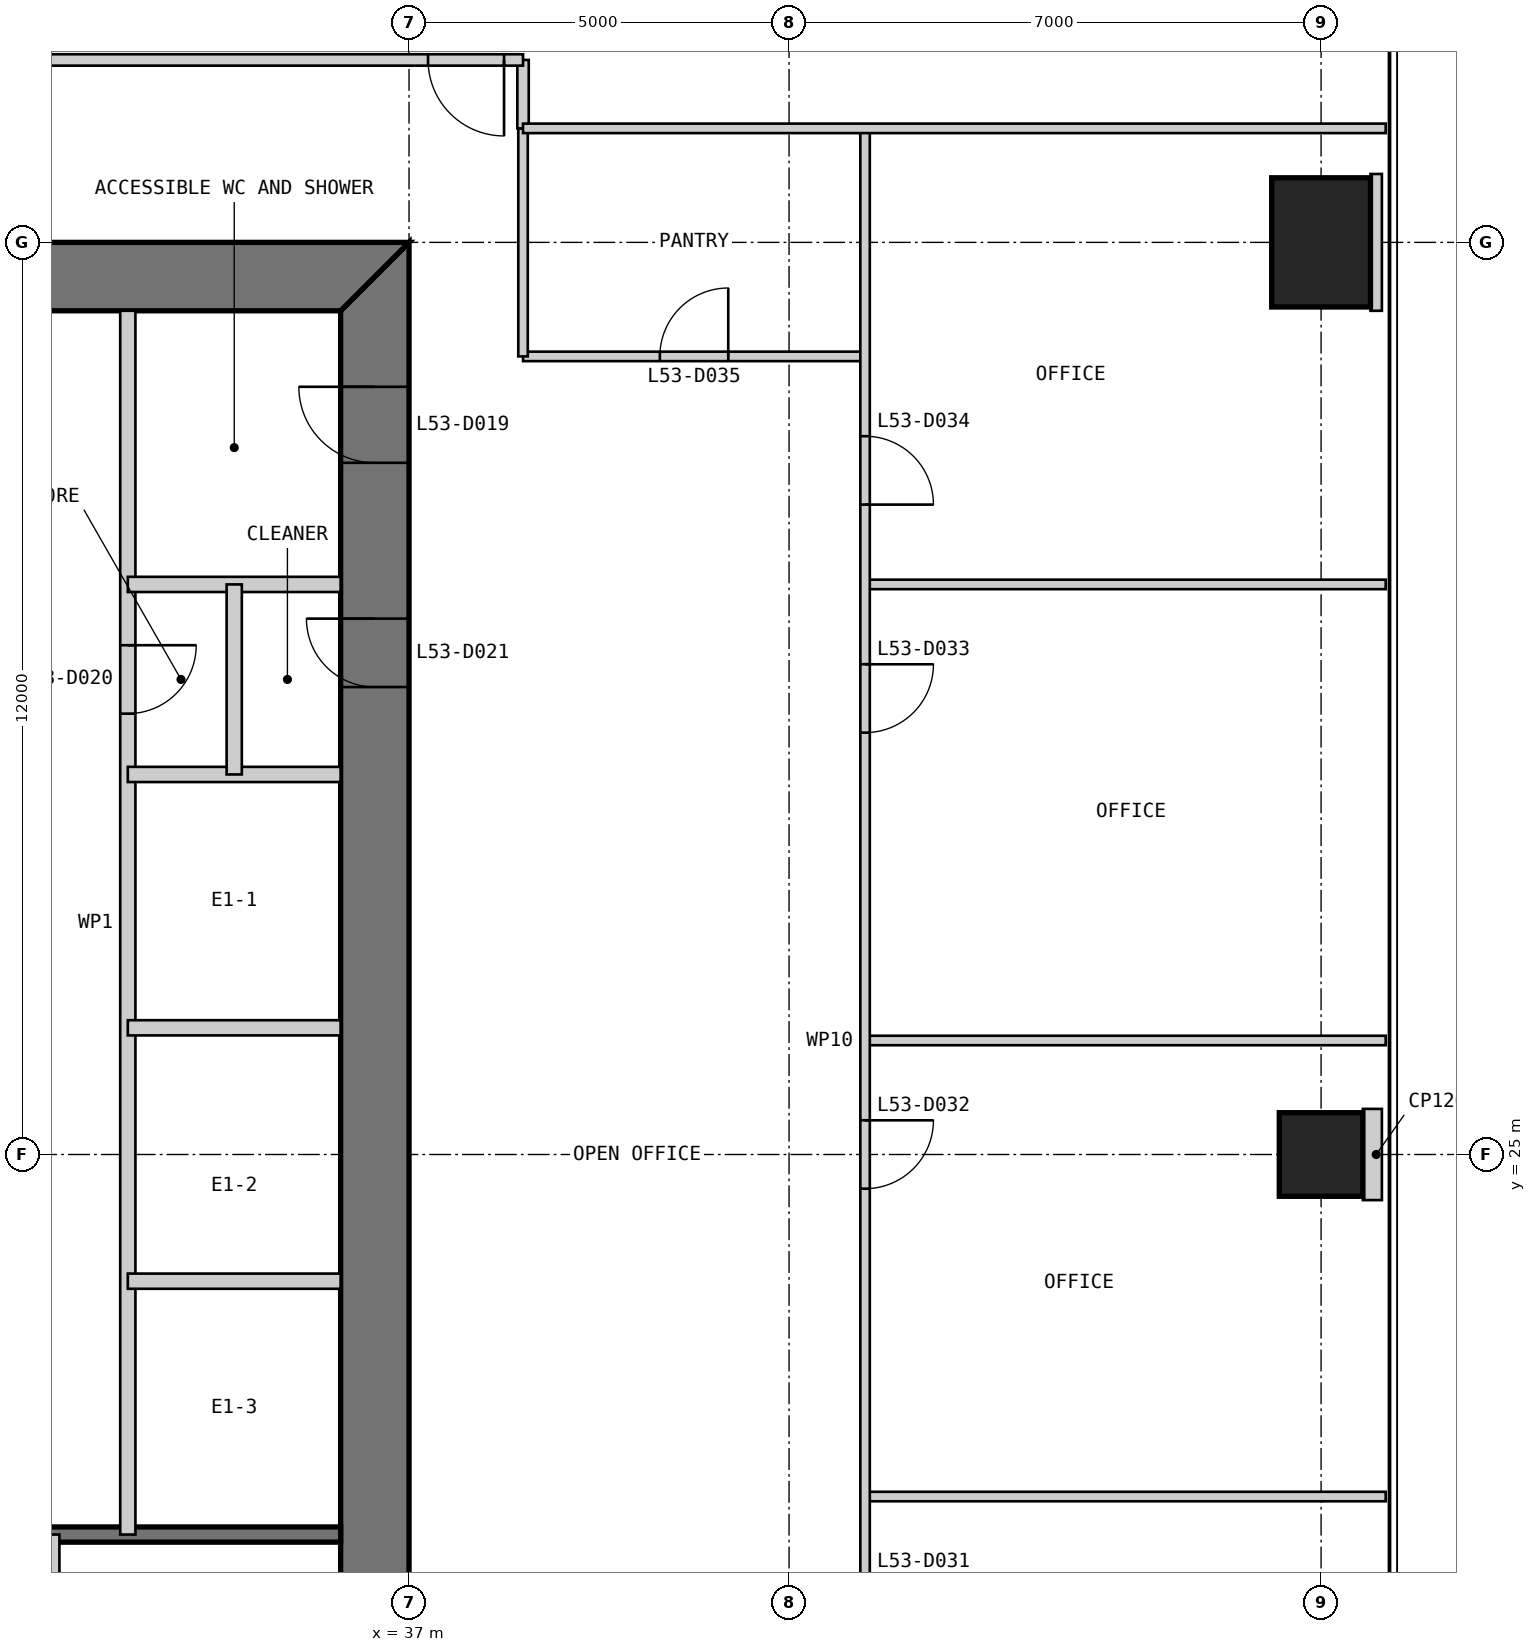
"""IFC4 building model, lengths in metres.
Left out: names, types, materials, properties, quantities, classifications, styles, units other than length and angle.
Written with IfcOpenShell. Run it as: python <this file> out.ifc"""

import sys

from ifc_helpers import new_model, si_unit, direction, frame, frame_2d, origin, origin_2d, place, context, subcontext, project, spatial, polyline, rectangle, outline, extrude, element, fill, save


model = new_model("IFC4")
c1 = context("Model", 3, precision=1e-05, world=origin(), true_north=direction((0.0, 1.0)))
c2 = subcontext(c1, "Body", "Model", "MODEL_VIEW")
j1 = project(units=[si_unit("LENGTHUNIT", "METRE"), si_unit("PLANEANGLEUNIT", "RADIAN")], contexts=[c1])
p1 = place(None, origin())
s1 = spatial("IfcSite", under=j1, at=p1, CompositionType="ELEMENT")
p2 = place(p1, origin())
s2 = spatial("IfcBuilding", under=s1, at=p2, CompositionType="ELEMENT")
p3 = place(p2, frame((0.0, 0.0, 225.8)))
s3 = spatial("IfcBuildingStorey", under=s2, at=p3, CompositionType="ELEMENT", Elevation=225.8)
p4 = place(p3, frame((49.0, 25.0, 0.0), z_axis=(0.0, 0.0, 1.0), x_axis=(1.0, 0.0, 0.0)))
e1 = element("IfcColumn", 1, at=p4, inside=s3, PredefinedType="COLUMN", context=c2, shape_type="SweptSolid", body=[
    extrude(rectangle(XDim=1.1, YDim=1.1, at=origin_2d()), origin(), (0.0, 0.0, 1.0), 4.0),
])
p5 = place(p3, frame((49.0, 37.0, 0.0), z_axis=(0.0, 0.0, 1.0), x_axis=(1.0, 0.0, 0.0)))
e2 = element("IfcColumn", 2, at=p5, inside=s3, PredefinedType="COLUMN", context=c2, shape_type="SweptSolid", body=[
    extrude(rectangle(XDim=1.3, YDim=1.7, at=origin_2d()), origin(), (0.0, 0.0, 1.0), 4.0),
])
p6 = place(p3, frame((36.55, 13.9, 0.0), z_axis=(0.0, 0.0, 1.0), x_axis=(0.0, 1.0, 0.0)))
e3 = element("IfcWall", 3, at=p6, inside=s3, PredefinedType="SHEAR", context=c2, shape_type="SweptSolid", body=[
    extrude(outline(polyline([(-0.9, -0.45), (23.1, -0.45), (22.2, 0.45), (0.0, 0.45), (-0.9, -0.45)])), origin(), (0.0, 0.0, 1.0), 4.0),
])
p7 = place(p6, frame((20.2, 0.0, 0.0)))
e4 = element("IfcOpeningElement", 4, at=p7, cuts=e3, PredefinedType="OPENING", context=c2, shape_type="SweptSolid", body=[
    extrude(rectangle(XDim=1.0, YDim=2.2, at=frame_2d((0.5, 1.1))), frame((0.0, 0.46, 0.0), z_axis=(0.0, -1.0, 0.0), x_axis=(1.0, 0.0, 0.0)), (0.0, 0.0, 1.0), 0.92),
])
p8 = place(p6, frame((17.25, 0.0, 0.0)))
e5 = element("IfcOpeningElement", 5, at=p8, cuts=e3, PredefinedType="OPENING", context=c2, shape_type="SweptSolid", body=[
    extrude(rectangle(XDim=0.9, YDim=2.2, at=frame_2d((0.45, 1.1))), frame((0.0, 0.46, 0.0), z_axis=(0.0, -1.0, 0.0), x_axis=(1.0, 0.0, 0.0)), (0.0, 0.0, 1.0), 0.92),
])
p9 = place(p3, frame((37.0, 36.55, 0.0), z_axis=(0.0, 0.0, 1.0), x_axis=(-1.0, 0.0, 0.0)))
e6 = element("IfcWall", 6, at=p9, inside=s3, PredefinedType="SHEAR", context=c2, shape_type="SweptSolid", body=[
    extrude(outline(polyline([(0.0, -0.45), (24.0, -0.45), (23.1, 0.45), (0.9, 0.45), (0.0, -0.45)])), origin(), (0.0, 0.0, 1.0), 4.0),
])
p10 = place(p9, frame((4.9, 0.0, 0.0)))
e7 = element("IfcOpeningElement", 7, at=p10, cuts=e6, PredefinedType="OPENING", context=c2, shape_type="SweptSolid", body=[
    extrude(rectangle(XDim=1.0, YDim=2.2, at=frame_2d((0.5, 1.1))), frame((0.0, 0.46, 0.0), z_axis=(0.0, -1.0, 0.0), x_axis=(1.0, 0.0, 0.0)), (0.0, 0.0, 1.0), 0.92),
])
p11 = place(p9, frame((8.9, 0.0, 0.0)))
e8 = element("IfcOpeningElement", 8, at=p11, cuts=e6, PredefinedType="OPENING", context=c2, shape_type="SweptSolid", body=[
    extrude(rectangle(XDim=1.1, YDim=2.2, at=frame_2d((0.55, 1.1))), frame((0.0, 0.46, 0.0), z_axis=(0.0, -1.0, 0.0), x_axis=(1.0, 0.0, 0.0)), (0.0, 0.0, 1.0), 0.92),
])
p12 = place(p9, frame((15.05, 0.0, 0.0)))
e9 = element("IfcOpeningElement", 9, at=p12, cuts=e6, PredefinedType="OPENING", context=c2, shape_type="SweptSolid", body=[
    extrude(rectangle(XDim=0.9, YDim=2.2, at=frame_2d((0.45, 1.1))), frame((0.0, 0.46, 0.0), z_axis=(0.0, -1.0, 0.0), x_axis=(1.0, 0.0, 0.0)), (0.0, 0.0, 1.0), 0.92),
])
p13 = place(p9, frame((17.9, 0.0, 0.0)))
e10 = element("IfcOpeningElement", 10, at=p13, cuts=e6, PredefinedType="OPENING", context=c2, shape_type="SweptSolid", body=[
    extrude(rectangle(XDim=1.0, YDim=2.2, at=frame_2d((0.5, 1.1))), frame((0.0, 0.46, 0.0), z_axis=(0.0, -1.0, 0.0), x_axis=(1.0, 0.0, 0.0)), (0.0, 0.0, 1.0), 0.92),
])
p14 = place(p9, frame((21.4, 0.0, 0.0)))
e11 = element("IfcOpeningElement", 11, at=p14, cuts=e6, PredefinedType="OPENING", context=c2, shape_type="SweptSolid", body=[
    extrude(rectangle(XDim=1.0, YDim=2.2, at=frame_2d((0.5, 1.1))), frame((0.0, 0.46, 0.0), z_axis=(0.0, -1.0, 0.0), x_axis=(1.0, 0.0, 0.0)), (0.0, 0.0, 1.0), 0.92),
])
p15 = place(p3, frame((20.3, 20.0, 0.0), z_axis=(0.0, 0.0, 1.0), x_axis=(1.0, 0.0, 0.0)))
e12 = element("IfcWall", 12, at=p15, inside=s3, PredefinedType="SOLIDWALL", context=c2, shape_type="SweptSolid", body=[
    extrude(rectangle(XDim=15.8, YDim=0.2, at=frame_2d((7.9, 0.0))), origin(), (0.0, 0.0, 1.0), 3.8),
])
p16 = place(p3, frame((32.3, 13.9, 0.0), z_axis=(0.0, 0.0, 1.0), x_axis=(0.0, 1.0, 0.0)))
e13 = element("IfcWall", 13, at=p16, inside=s3, PredefinedType="PARTITIONING", context=c2, shape_type="SweptSolid", body=[
    extrude(rectangle(XDim=6.1, YDim=0.2, at=frame_2d((3.05, 0.0))), origin(), (0.0, 0.0, 1.0), 3.8),
])
p17 = place(p3, frame((33.3, 36.1, 0.0), z_axis=(0.0, 0.0, 1.0), x_axis=(0.0, -1.0, 0.0)))
e14 = element("IfcWall", 14, at=p17, inside=s3, PredefinedType="PARTITIONING", context=c2, shape_type="SweptSolid", body=[
    extrude(rectangle(XDim=16.1, YDim=0.2, at=frame_2d((8.05, 0.0))), origin(), (0.0, 0.0, 1.0), 3.8),
])
p18 = place(p17, frame((4.4, 0.0, 0.0)))
e15 = element("IfcOpeningElement", 15, at=p18, cuts=e14, PredefinedType="OPENING", context=c2, shape_type="SweptSolid", body=[
    extrude(rectangle(XDim=0.9, YDim=2.2, at=frame_2d((0.45, 1.1))), frame((0.0, 0.11, 0.0), z_axis=(0.0, -1.0, 0.0), x_axis=(1.0, 0.0, 0.0)), (0.0, 0.0, 1.0), 0.22),
])
for number, where, z_axis, x_axis in (
    (16, (36.1, 30.0, 0.0), (0.0, 0.0, 1.0), (-1.0, 0.0, 0.0)),
    (17, (36.1, 26.667, 0.0), (0.0, 0.0, 1.0), (-1.0, 0.0, 0.0)),
    (18, (36.1, 23.333, 0.0), (0.0, 0.0, 1.0), (-1.0, 0.0, 0.0)),
    (19, (36.1, 32.5, 0.0), (0.0, 0.0, 1.0), (-1.0, 0.0, 0.0)),
):
    element("IfcWall", number, at=place(p3, frame(where, z_axis=z_axis, x_axis=x_axis)), inside=s3, PredefinedType="PARTITIONING", context=c2, shape_type="SweptSolid", body=[
        extrude(rectangle(XDim=2.8, YDim=0.2, at=frame_2d((1.4, 0.0))), origin(), (0.0, 0.0, 1.0), 3.8),
    ])
p19 = place(p3, frame((34.7, 32.5, 0.0), z_axis=(0.0, 0.0, 1.0), x_axis=(0.0, -1.0, 0.0)))
e20 = element("IfcWall", 20, at=p19, inside=s3, PredefinedType="PARTITIONING", context=c2, shape_type="SweptSolid", body=[
    extrude(rectangle(XDim=2.5, YDim=0.2, at=frame_2d((1.25, 0.0))), origin(), (0.0, 0.0, 1.0), 3.8),
])
for number, where, z_axis, x_axis in (
    (21, (49.85, 20.5, 0.0), (0.0, 0.0, 1.0), (-1.0, 0.0, 0.0)),
    (22, (49.85, 26.5, 0.0), (0.0, 0.0, 1.0), (-1.0, 0.0, 0.0)),
    (23, (49.85, 32.5, 0.0), (0.0, 0.0, 1.0), (-1.0, 0.0, 0.0)),
):
    element("IfcWall", number, at=place(p3, frame(where, z_axis=z_axis, x_axis=x_axis)), inside=s3, PredefinedType="PARTITIONING", context=c2, shape_type="SweptSolid", body=[
        extrude(rectangle(XDim=6.85, YDim=0.125, at=frame_2d((3.425, 0.0))), origin(), (0.0, 0.0, 1.0), 3.85),
    ])
p20 = place(p3, frame((43.0, 35.5, 0.0), z_axis=(0.0, 0.0, 1.0), x_axis=(-1.0, 0.0, 0.0)))
e24 = element("IfcWall", 24, at=p20, inside=s3, PredefinedType="PARTITIONING", context=c2, shape_type="SweptSolid", body=[
    extrude(rectangle(XDim=4.5, YDim=0.125, at=frame_2d((2.25, 0.0))), origin(), (0.0, 0.0, 1.0), 3.85),
])
p21 = place(p20, frame((1.8, 0.0, 0.0)))
e25 = element("IfcOpeningElement", 25, at=p21, cuts=e24, PredefinedType="OPENING", context=c2, shape_type="SweptSolid", body=[
    extrude(rectangle(XDim=0.9, YDim=2.2, at=frame_2d((0.45, 1.1))), frame((0.0, 0.073, 0.0), z_axis=(0.0, -1.0, 0.0), x_axis=(1.0, 0.0, 0.0)), (0.0, 0.0, 1.0), 0.145),
])
p22 = place(p3, frame((43.0, 14.5, 0.0), z_axis=(0.0, 0.0, 1.0), x_axis=(0.0, 1.0, 0.0)))
e26 = element("IfcWall", 26, at=p22, inside=s3, PredefinedType="PARTITIONING", context=c2, shape_type="SweptSolid", body=[
    extrude(rectangle(XDim=24.0, YDim=0.125, at=frame_2d((12.0, 0.0))), origin(), (0.0, 0.0, 1.0), 3.238),
])
p23 = place(p22, frame((4.05, 0.0, 0.0)))
e27 = element("IfcOpeningElement", 27, at=p23, cuts=e26, PredefinedType="OPENING", context=c2, shape_type="SweptSolid", body=[
    extrude(rectangle(XDim=0.9, YDim=2.2, at=frame_2d((0.45, 1.1))), frame((0.0, 0.073, 0.0), z_axis=(0.0, -1.0, 0.0), x_axis=(1.0, 0.0, 0.0)), (0.0, 0.0, 1.0), 0.145),
])
p24 = place(p22, frame((10.05, 0.0, 0.0)))
e28 = element("IfcOpeningElement", 28, at=p24, cuts=e26, PredefinedType="OPENING", context=c2, shape_type="SweptSolid", body=[
    extrude(rectangle(XDim=0.9, YDim=2.2, at=frame_2d((0.45, 1.1))), frame((0.0, 0.073, 0.0), z_axis=(0.0, -1.0, 0.0), x_axis=(1.0, 0.0, 0.0)), (0.0, 0.0, 1.0), 0.145),
])
p25 = place(p22, frame((16.05, 0.0, 0.0)))
e29 = element("IfcOpeningElement", 29, at=p25, cuts=e26, PredefinedType="OPENING", context=c2, shape_type="SweptSolid", body=[
    extrude(rectangle(XDim=0.9, YDim=2.2, at=frame_2d((0.45, 1.1))), frame((0.0, 0.073, 0.0), z_axis=(0.0, -1.0, 0.0), x_axis=(1.0, 0.0, 0.0)), (0.0, 0.0, 1.0), 0.145),
])
p26 = place(p22, frame((19.05, 0.0, 0.0)))
e30 = element("IfcOpeningElement", 30, at=p26, cuts=e26, PredefinedType="OPENING", context=c2, shape_type="SweptSolid", body=[
    extrude(rectangle(XDim=0.9, YDim=2.2, at=frame_2d((0.45, 1.1))), frame((0.0, 0.073, 0.0), z_axis=(0.0, -1.0, 0.0), x_axis=(1.0, 0.0, 0.0)), (0.0, 0.0, 1.0), 0.145),
])
p27 = place(p3, frame((38.5, 35.5, 0.0), z_axis=(0.0, 0.0, 1.0), x_axis=(0.0, 1.0, 0.0)))
e31 = element("IfcWall", 31, at=p27, inside=s3, PredefinedType="PARTITIONING", context=c2, shape_type="SweptSolid", body=[
    extrude(rectangle(XDim=3.0, YDim=0.125, at=frame_2d((1.5, 0.0))), origin(), (0.0, 0.0, 1.0), 3.85),
])
p28 = place(p3, frame((38.5, 38.5, 0.0), z_axis=(0.0, 0.0, 1.0), x_axis=(0.0, 1.0, 0.0)))
e32 = element("IfcWall", 32, at=p28, inside=s3, PredefinedType="PARTITIONING", context=c2, shape_type="SweptSolid", body=[
    extrude(rectangle(XDim=0.9, YDim=0.15, at=frame_2d((0.45, 0.0))), origin(), (0.0, 0.0, 1.0), 3.85),
])
p29 = place(p3, frame((38.5, 39.4, 0.0), z_axis=(0.0, 0.0, 1.0), x_axis=(-1.0, 0.0, 0.0)))
e33 = element("IfcWall", 33, at=p29, inside=s3, PredefinedType="PARTITIONING", context=c2, shape_type="SweptSolid", body=[
    extrude(rectangle(XDim=27.0, YDim=0.15, at=frame_2d((13.5, 0.0))), origin(), (0.0, 0.0, 1.0), 3.85),
])
p30 = place(p29, frame((12.25, 0.0, 0.0)))
e34 = element("IfcOpeningElement", 34, at=p30, cuts=e33, PredefinedType="OPENING", context=c2, shape_type="SweptSolid", body=[
    extrude(rectangle(XDim=1.0, YDim=2.2, at=frame_2d((0.5, 1.1))), frame((0.0, 0.085, 0.0), z_axis=(0.0, -1.0, 0.0), x_axis=(1.0, 0.0, 0.0)), (0.0, 0.0, 1.0), 0.17),
])
p31 = place(p29, frame((19.75, 0.0, 0.0)))
e35 = element("IfcOpeningElement", 35, at=p31, cuts=e33, PredefinedType="OPENING", context=c2, shape_type="SweptSolid", body=[
    extrude(rectangle(XDim=1.0, YDim=2.2, at=frame_2d((0.5, 1.1))), frame((0.0, 0.085, 0.0), z_axis=(0.0, -1.0, 0.0), x_axis=(1.0, 0.0, 0.0)), (0.0, 0.0, 1.0), 0.17),
])
p32 = place(p29, frame((0.25, 0.0, 0.0)))
e36 = element("IfcOpeningElement", 36, at=p32, cuts=e33, PredefinedType="OPENING", context=c2, shape_type="SweptSolid", body=[
    extrude(rectangle(XDim=1.0, YDim=2.2, at=frame_2d((0.5, 1.1))), frame((0.0, 0.085, 0.0), z_axis=(0.0, -1.0, 0.0), x_axis=(1.0, 0.0, 0.0)), (0.0, 0.0, 1.0), 0.17),
])
p33 = place(p29, frame((10.75, 0.0, 0.0)))
e37 = element("IfcOpeningElement", 37, at=p33, cuts=e33, PredefinedType="OPENING", context=c2, shape_type="SweptSolid", body=[
    extrude(rectangle(XDim=1.0, YDim=2.2, at=frame_2d((0.5, 1.1))), frame((0.0, 0.085, 0.0), z_axis=(0.0, -1.0, 0.0), x_axis=(1.0, 0.0, 0.0)), (0.0, 0.0, 1.0), 0.17),
])
p34 = place(p29, frame((22.0, 0.0, 0.0)))
e38 = element("IfcOpeningElement", 38, at=p34, cuts=e33, PredefinedType="OPENING", context=c2, shape_type="SweptSolid", body=[
    extrude(rectangle(XDim=1.0, YDim=2.2, at=frame_2d((0.5, 1.1))), frame((0.0, 0.085, 0.0), z_axis=(0.0, -1.0, 0.0), x_axis=(1.0, 0.0, 0.0)), (0.0, 0.0, 1.0), 0.17),
])
p35 = place(p29, frame((25.0, 0.0, 0.0)))
e39 = element("IfcOpeningElement", 39, at=p35, cuts=e33, PredefinedType="OPENING", context=c2, shape_type="SweptSolid", body=[
    extrude(rectangle(XDim=1.0, YDim=2.2, at=frame_2d((0.5, 1.1))), frame((0.0, 0.085, 0.0), z_axis=(0.0, -1.0, 0.0), x_axis=(1.0, 0.0, 0.0)), (0.0, 0.0, 1.0), 0.17),
])
p36 = place(p3, frame((49.85, 38.5, 0.0), z_axis=(0.0, 0.0, 1.0), x_axis=(-1.0, 0.0, 0.0)))
e40 = element("IfcWall", 40, at=p36, inside=s3, PredefinedType="PARTITIONING", context=c2, shape_type="SweptSolid", body=[
    extrude(rectangle(XDim=11.35, YDim=0.125, at=frame_2d((5.675, 0.0))), origin(), (0.0, 0.0, 1.0), 3.85),
])
p37 = place(p3, frame((49.8, 25.0, 0.0), z_axis=(0.0, 0.0, 1.0), x_axis=(-1.0, 0.0, 0.0)))
e41 = element("IfcWall", 41, at=p37, inside=s3, PredefinedType="PARTITIONING", context=c2, shape_type="SweptSolid", body=[
    extrude(rectangle(XDim=0.25, YDim=1.2, at=frame_2d((0.125, 0.0))), origin(), (0.0, 0.0, 1.0), 3.85),
])
p38 = place(p3, frame((49.8, 37.0, 0.0), z_axis=(0.0, 0.0, 1.0), x_axis=(-1.0, 0.0, 0.0)))
e42 = element("IfcWall", 42, at=p38, inside=s3, PredefinedType="PARTITIONING", context=c2, shape_type="SweptSolid", body=[
    extrude(rectangle(XDim=0.15, YDim=1.8, at=frame_2d((0.075, 0.0))), origin(), (0.0, 0.0, 1.0), 3.85),
])
p39 = place(p7, origin())
e43 = element("IfcDoor", 43, at=p39, inside=s3, OperationType="SINGLE_SWING_RIGHT", PredefinedType="DOOR", context=c2, shape_type="SweptSolid", body=[
    extrude(rectangle(XDim=1.0, YDim=2.2, at=frame_2d((0.5, 1.1))), frame((0.0, 0.025, 0.0), z_axis=(0.0, -1.0, 0.0), x_axis=(1.0, 0.0, 0.0)), (0.0, 0.0, 1.0), 0.05),
    extrude(outline(polyline([(0.0, 0.0), (0.04, 0.0), (0.04, 2.16), (0.96, 2.16), (0.96, 0.0), (1.0, 0.0), (1.0, 2.2), (0.0, 2.2), (0.0, 0.0)])), frame((0.0, 0.3, 0.0), z_axis=(0.0, -1.0, 0.0), x_axis=(1.0, 0.0, 0.0)), (0.0, 0.0, 1.0), 0.6),
])
fill(e4, e43)
p40 = place(p18, origin())
e44 = element("IfcDoor", 44, at=p40, inside=s3, OperationType="SINGLE_SWING_LEFT", PredefinedType="DOOR", context=c2, shape_type="SweptSolid", body=[
    extrude(rectangle(XDim=0.9, YDim=2.2, at=frame_2d((0.45, 1.1))), frame((0.0, 0.025, 0.0), z_axis=(0.0, -1.0, 0.0), x_axis=(1.0, 0.0, 0.0)), (0.0, 0.0, 1.0), 0.05),
])
fill(e15, e44)
p41 = place(p8, origin())
e45 = element("IfcDoor", 45, at=p41, inside=s3, OperationType="SINGLE_SWING_RIGHT", PredefinedType="DOOR", context=c2, shape_type="SweptSolid", body=[
    extrude(rectangle(XDim=0.9, YDim=2.2, at=frame_2d((0.45, 1.1))), frame((0.0, 0.025, 0.0), z_axis=(0.0, -1.0, 0.0), x_axis=(1.0, 0.0, 0.0)), (0.0, 0.0, 1.0), 0.05),
    extrude(outline(polyline([(0.0, 0.0), (0.04, 0.0), (0.04, 2.16), (0.86, 2.16), (0.86, 0.0), (0.9, 0.0), (0.9, 2.2), (0.0, 2.2), (0.0, 0.0)])), frame((0.0, 0.3, 0.0), z_axis=(0.0, -1.0, 0.0), x_axis=(1.0, 0.0, 0.0)), (0.0, 0.0, 1.0), 0.6),
])
fill(e5, e45)
p42 = place(p24, frame((0.9, 0.0, 0.0), z_axis=(0.0, 0.0, 1.0), x_axis=(-1.0, 0.0, 0.0)))
e46 = element("IfcDoor", 46, at=p42, inside=s3, OperationType="SINGLE_SWING_LEFT", PredefinedType="DOOR", context=c2, shape_type="SweptSolid", body=[
    extrude(rectangle(XDim=0.9, YDim=2.2, at=frame_2d((0.45, 1.1))), frame((0.0, 0.025, 0.0), z_axis=(0.0, -1.0, 0.0), x_axis=(1.0, 0.0, 0.0)), (0.0, 0.0, 1.0), 0.05),
])
fill(e28, e46)
p43 = place(p25, frame((0.9, 0.0, 0.0), z_axis=(0.0, 0.0, 1.0), x_axis=(-1.0, 0.0, 0.0)))
e47 = element("IfcDoor", 47, at=p43, inside=s3, OperationType="SINGLE_SWING_LEFT", PredefinedType="DOOR", context=c2, shape_type="SweptSolid", body=[
    extrude(rectangle(XDim=0.9, YDim=2.2, at=frame_2d((0.45, 1.1))), frame((0.0, 0.025, 0.0), z_axis=(0.0, -1.0, 0.0), x_axis=(1.0, 0.0, 0.0)), (0.0, 0.0, 1.0), 0.05),
])
fill(e29, e47)
p44 = place(p26, frame((0.9, 0.0, 0.0), z_axis=(0.0, 0.0, 1.0), x_axis=(-1.0, 0.0, 0.0)))
e48 = element("IfcDoor", 48, at=p44, inside=s3, OperationType="SINGLE_SWING_RIGHT", PredefinedType="DOOR", context=c2, shape_type="SweptSolid", body=[
    extrude(rectangle(XDim=0.9, YDim=2.2, at=frame_2d((0.45, 1.1))), frame((0.0, 0.025, 0.0), z_axis=(0.0, -1.0, 0.0), x_axis=(1.0, 0.0, 0.0)), (0.0, 0.0, 1.0), 0.05),
])
fill(e30, e48)
p45 = place(p21, frame((0.9, 0.0, 0.0), z_axis=(0.0, 0.0, 1.0), x_axis=(-1.0, 0.0, 0.0)))
e49 = element("IfcDoor", 49, at=p45, inside=s3, OperationType="SINGLE_SWING_RIGHT", PredefinedType="DOOR", context=c2, shape_type="SweptSolid", body=[
    extrude(rectangle(XDim=0.9, YDim=2.2, at=frame_2d((0.45, 1.1))), frame((0.0, 0.025, 0.0), z_axis=(0.0, -1.0, 0.0), x_axis=(1.0, 0.0, 0.0)), (0.0, 0.0, 1.0), 0.05),
])
fill(e25, e49)
p46 = place(p32, origin())
e50 = element("IfcDoor", 50, at=p46, inside=s3, OperationType="SINGLE_SWING_LEFT", PredefinedType="DOOR", context=c2, shape_type="SweptSolid", body=[
    extrude(rectangle(XDim=1.0, YDim=2.2, at=frame_2d((0.5, 1.1))), frame((0.0, 0.025, 0.0), z_axis=(0.0, -1.0, 0.0), x_axis=(1.0, 0.0, 0.0)), (0.0, 0.0, 1.0), 0.05),
])
fill(e36, e50)
save(model, sys.argv[1])
